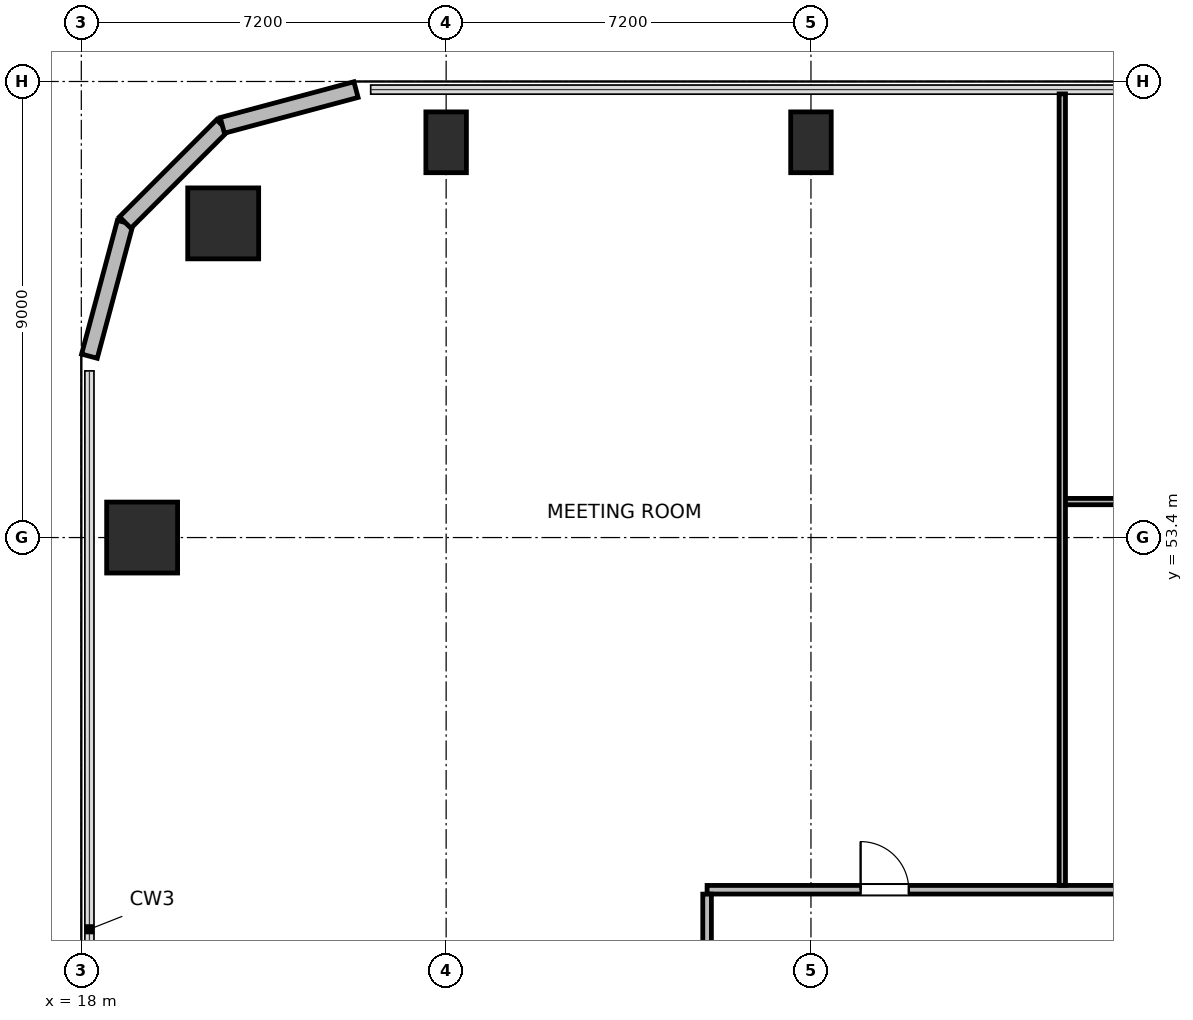
"""IFC4 building model, lengths in metres.
Left out: names, types, materials, properties, quantities, classifications, styles, units other than length and angle.
Written with IfcOpenShell. Run it as: python <this file> out.ifc"""

import sys

from ifc_helpers import new_model, si_unit, direction, frame, frame_2d, origin, origin_2d, place, context, subcontext, project, spatial, rectangle, circle, extrude, element, fill, save


model = new_model("IFC4")
c1 = context("Model", 3, precision=1e-05, world=origin(), true_north=direction((0.0, 1.0)))
c2 = subcontext(c1, "Body", "Model", "MODEL_VIEW")
j1 = project(units=[si_unit("LENGTHUNIT", "METRE"), si_unit("PLANEANGLEUNIT", "RADIAN")], contexts=[c1])
p1 = place(None, origin())
s1 = spatial("IfcSite", under=j1, at=p1, CompositionType="ELEMENT")
p2 = place(p1, origin())
s2 = spatial("IfcBuilding", under=s1, at=p2, CompositionType="ELEMENT")
p3 = place(p2, frame((0.0, 0.0, 133.8)))
s3 = spatial("IfcBuildingStorey", under=s2, at=p3, CompositionType="ELEMENT", Elevation=133.8)
p4 = place(p3, frame((20.8, 59.6, 0.0), z_axis=(0.0, 0.0, 1.0), x_axis=(1.0, 0.0, 0.0)))
e1 = element("IfcColumn", 1, at=p4, inside=s3, PredefinedType="COLUMN", context=c2, shape_type="SweptSolid", body=[
    extrude(circle(Radius=0.7, at=origin_2d()), origin(), (0.0, 0.0, 1.0), 3.9),
])
for number, where, z_axis, x_axis in (
    (2, (25.2, 61.2, 0.0), (0.0, 0.0, 1.0), (1.0, 0.0, 0.0)),
    (3, (32.4, 61.2, 0.0), (0.0, 0.0, 1.0), (1.0, 0.0, 0.0)),
):
    element("IfcColumn", number, at=place(p3, frame(where, z_axis=z_axis, x_axis=x_axis)), inside=s3, PredefinedType="COLUMN", context=c2, shape_type="SweptSolid", body=[
        extrude(rectangle(XDim=0.8, YDim=1.2, at=origin_2d()), origin(), (0.0, 0.0, 1.0), 3.9),
    ])
p5 = place(p3, frame((19.2, 53.4, 0.0), z_axis=(0.0, 0.0, 1.0), x_axis=(1.0, 0.0, 0.0)))
e4 = element("IfcColumn", 4, at=p5, inside=s3, PredefinedType="COLUMN", context=c2, shape_type="SweptSolid", body=[
    extrude(rectangle(XDim=1.4, YDim=1.4, at=origin_2d()), origin(), (0.0, 0.0, 1.0), 3.9),
])
p6 = place(p3, frame((18.16, 56.979, 0.0), z_axis=(0.0, 0.0, 1.0), x_axis=(0.25869736047, 0.965958423373, 0.0)))
e5 = element("IfcWall", 5, at=p6, inside=s3, PredefinedType="SOLIDWALL", context=c2, shape_type="SweptSolid", body=[
    extrude(rectangle(XDim=2.731, YDim=0.32, at=frame_2d((1.366, 0.0))), origin(), (0.0, 0.0, 1.0), 3.64),
])
p7 = place(p3, frame((18.866, 59.617, 0.0), z_axis=(0.0, 0.0, 1.0), x_axis=(0.707106781187, 0.707106781187, 0.0)))
e6 = element("IfcWall", 6, at=p7, inside=s3, PredefinedType="SOLIDWALL", context=c2, shape_type="SweptSolid", body=[
    extrude(rectangle(XDim=2.71, YDim=0.32, at=frame_2d((1.355, 0.0))), origin(), (0.0, 0.0, 1.0), 3.64),
])
p8 = place(p3, frame((20.783, 61.533, 0.0), z_axis=(0.0, 0.0, 1.0), x_axis=(0.965964405026, 0.25867502435, 0.0)))
e7 = element("IfcWall", 7, at=p8, inside=s3, PredefinedType="SOLIDWALL", context=c2, shape_type="SweptSolid", body=[
    extrude(rectangle(XDim=2.731, YDim=0.32, at=frame_2d((1.366, 0.0))), origin(), (0.0, 0.0, 1.0), 3.64),
])
p9 = place(p3, frame((30.35, 46.45, 0.0), z_axis=(0.0, 0.0, 1.0), x_axis=(1.0, 0.0, 0.0)))
e8 = element("IfcWall", 8, at=p9, inside=s3, PredefinedType="PARTITIONING", context=c2, shape_type="SweptSolid", body=[
    extrude(rectangle(XDim=33.25, YDim=0.17, at=frame_2d((16.625, 0.0))), origin(), (0.0, 0.0, 1.0), 3.64),
])
p10 = place(p9, frame((3.03, 0.0, 0.0)))
e9 = element("IfcOpeningElement", 9, at=p10, cuts=e8, PredefinedType="OPENING", context=c2, shape_type="SweptSolid", body=[
    extrude(rectangle(XDim=0.95, YDim=2.04, at=frame_2d((0.475, 1.02))), frame((0.0, 0.095, 0.0), z_axis=(0.0, -1.0, 0.0), x_axis=(1.0, 0.0, 0.0)), (0.0, 0.0, 1.0), 0.19),
])
p11 = place(p9, frame((10.09, 0.0, 0.0)))
e10 = element("IfcOpeningElement", 10, at=p11, cuts=e8, PredefinedType="OPENING", context=c2, shape_type="SweptSolid", body=[
    extrude(rectangle(XDim=0.95, YDim=2.04, at=frame_2d((0.475, 1.02))), frame((0.0, 0.095, 0.0), z_axis=(0.0, -1.0, 0.0), x_axis=(1.0, 0.0, 0.0)), (0.0, 0.0, 1.0), 0.19),
])
p12 = place(p9, frame((15.1, 0.0, 0.0)))
e11 = element("IfcOpeningElement", 11, at=p12, cuts=e8, PredefinedType="OPENING", context=c2, shape_type="SweptSolid", body=[
    extrude(rectangle(XDim=0.95, YDim=2.04, at=frame_2d((0.475, 1.02))), frame((0.0, 0.095, 0.0), z_axis=(0.0, -1.0, 0.0), x_axis=(1.0, 0.0, 0.0)), (0.0, 0.0, 1.0), 0.19),
])
p13 = place(p9, frame((21.16, 0.0, 0.0)))
e12 = element("IfcOpeningElement", 12, at=p13, cuts=e8, PredefinedType="OPENING", context=c2, shape_type="SweptSolid", body=[
    extrude(rectangle(XDim=0.95, YDim=2.04, at=frame_2d((0.475, 1.02))), frame((0.0, 0.095, 0.0), z_axis=(0.0, -1.0, 0.0), x_axis=(1.0, 0.0, 0.0)), (0.0, 0.0, 1.0), 0.19),
])
p14 = place(p9, frame((29.27, 0.0, 0.0)))
e13 = element("IfcOpeningElement", 13, at=p14, cuts=e8, PredefinedType="OPENING", context=c2, shape_type="SweptSolid", body=[
    extrude(rectangle(XDim=0.95, YDim=2.04, at=frame_2d((0.475, 1.02))), frame((0.0, 0.095, 0.0), z_axis=(0.0, -1.0, 0.0), x_axis=(1.0, 0.0, 0.0)), (0.0, 0.0, 1.0), 0.19),
])
p15 = place(p3, frame((30.35, 37.1, 0.0), z_axis=(0.0, 0.0, 1.0), x_axis=(0.0, 1.0, 0.0)))
e14 = element("IfcWall", 14, at=p15, inside=s3, PredefinedType="PARTITIONING", context=c2, shape_type="SweptSolid", body=[
    extrude(rectangle(XDim=9.263, YDim=0.17, at=frame_2d((4.631, 0.0))), origin(), (0.0, 0.0, 1.0), 3.64),
])
p16 = place(p15, frame((4.2, 0.0, 0.0)))
e15 = element("IfcOpeningElement", 15, at=p16, cuts=e14, PredefinedType="OPENING", context=c2, shape_type="SweptSolid", body=[
    extrude(rectangle(XDim=0.95, YDim=2.04, at=frame_2d((0.475, 1.02))), frame((0.0, 0.095, 0.0), z_axis=(0.0, -1.0, 0.0), x_axis=(1.0, 0.0, 0.0)), (0.0, 0.0, 1.0), 0.19),
])
p17 = place(p3, frame((37.36, 54.11, 0.0), z_axis=(0.0, 0.0, 1.0), x_axis=(1.0, 0.0, 0.0)))
e16 = element("IfcWall", 16, at=p17, inside=s3, PredefinedType="PARTITIONING", context=c2, shape_type="SweptSolid", body=[
    extrude(rectangle(XDim=7.11, YDim=0.125, at=frame_2d((3.555, 0.0))), origin(), (0.0, 0.0, 1.0), 3.64),
])
p18 = place(p17, frame((3.105, 0.0, 0.0)))
e17 = element("IfcOpeningElement", 17, at=p18, cuts=e16, PredefinedType="OPENING", context=c2, shape_type="SweptSolid", body=[
    extrude(rectangle(XDim=0.9, YDim=2.02, at=frame_2d((0.45, 1.01))), frame((0.0, 0.073, 0.0), z_axis=(0.0, -1.0, 0.0), x_axis=(1.0, 0.0, 0.0)), (0.0, 0.0, 1.0), 0.145),
])
p19 = place(p3, frame((37.36, 46.537, 0.0), z_axis=(0.0, 0.0, 1.0), x_axis=(0.0, 1.0, 0.0)))
e18 = element("IfcWall", 18, at=p19, inside=s3, PredefinedType="PARTITIONING", context=c2, shape_type="SweptSolid", body=[
    extrude(rectangle(XDim=15.618, YDim=0.125, at=frame_2d((7.809, 0.0))), origin(), (0.0, 0.0, 1.0), 3.64),
])
p20 = place(p10, origin())
e19 = element("IfcDoor", 19, at=p20, inside=s3, OperationType="SINGLE_SWING_LEFT", PredefinedType="DOOR", context=c2, shape_type="SweptSolid", body=[
    extrude(rectangle(XDim=0.95, YDim=2.04, at=frame_2d((0.475, 1.02))), frame((0.0, 0.025, 0.0), z_axis=(0.0, -1.0, 0.0), x_axis=(1.0, 0.0, 0.0)), (0.0, 0.0, 1.0), 0.05),
])
fill(e9, e19)
save(model, sys.argv[1])
